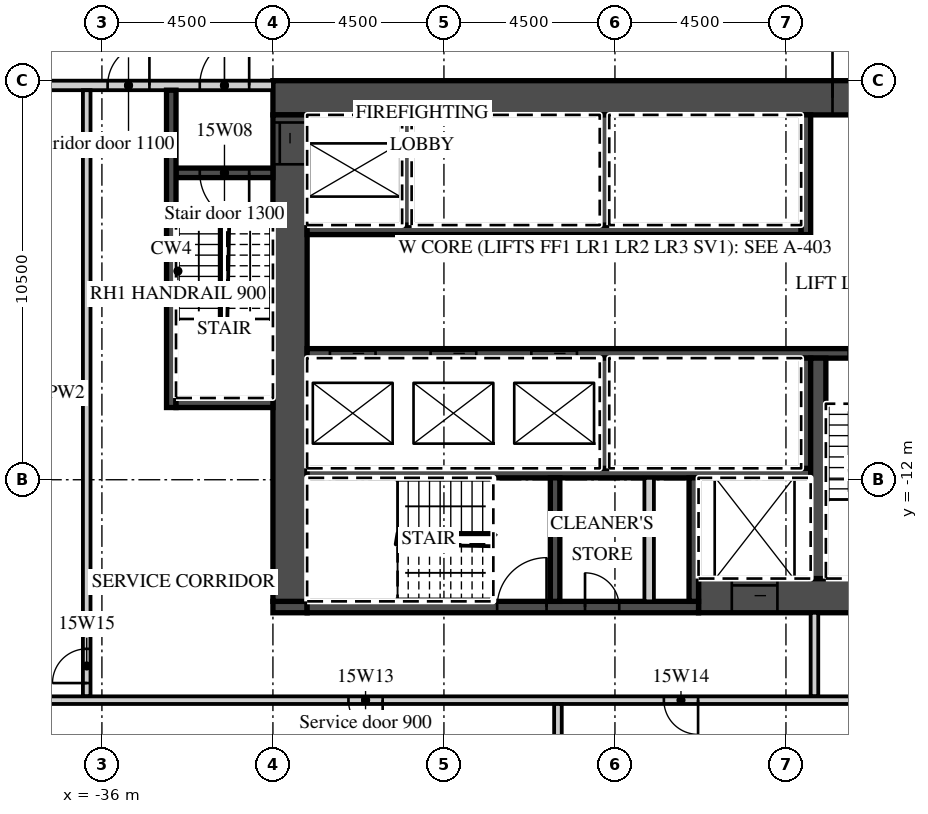
"""IFC4 building model, lengths in metres.
Left out: names, types, materials, properties, quantities, classifications, styles, units other than length and angle.
Written with IfcOpenShell. Run it as: python <this file> out.ifc"""

import sys

from ifc_helpers import new_model, si_unit, direction, frame, frame_2d, origin, place, context, subcontext, project, spatial, rectangle, extrude, element, fill, save


model = new_model("IFC4")
c1 = context("Model", 3, precision=1e-05, world=origin(), true_north=direction((0.0, 1.0)))
c2 = subcontext(c1, "Body", "Model", "MODEL_VIEW")
j1 = project(units=[si_unit("LENGTHUNIT", "METRE"), si_unit("PLANEANGLEUNIT", "RADIAN")], contexts=[c1])
p1 = place(None, origin())
s1 = spatial("IfcSite", under=j1, at=p1, CompositionType="ELEMENT")
p2 = place(p1, origin())
s2 = spatial("IfcBuilding", under=s1, at=p2, CompositionType="ELEMENT")
p3 = place(p2, frame((0.0, 0.0, 79.8)))
s3 = spatial("IfcBuildingStorey", under=s2, at=p3, CompositionType="ELEMENT", Elevation=79.8)
p4 = place(p3, frame((-31.5, -1.95, 0.0), z_axis=(0.0, 0.0, 1.0), x_axis=(1.0, 0.0, 0.0)))
e1 = element("IfcWall", 1, at=p4, inside=s3, PredefinedType="SHEAR", context=c2, shape_type="SweptSolid", body=[
    extrude(rectangle(XDim=18.0, YDim=0.9, at=frame_2d((9.0, 0.0))), origin(), (0.0, 0.0, 1.0), 3.02),
])
p5 = place(p4, frame((14.725, 0.0, 0.0)))
e2 = element("IfcOpeningElement", 2, at=p5, cuts=e1, PredefinedType="OPENING", context=c2, shape_type="SweptSolid", body=[
    extrude(rectangle(XDim=1.8, YDim=2.1, at=frame_2d((0.9, 1.05))), frame((0.0, 0.46, 0.0), z_axis=(0.0, -1.0, 0.0), x_axis=(1.0, 0.0, 0.0)), (0.0, 0.0, 1.0), 0.92),
])
p6 = place(p3, frame((-20.3, -15.05, 0.0), z_axis=(0.0, 0.0, 1.0), x_axis=(1.0, 0.0, 0.0)))
e3 = element("IfcWall", 3, at=p6, inside=s3, PredefinedType="SHEAR", context=c2, shape_type="SweptSolid", body=[
    extrude(rectangle(XDim=6.8, YDim=0.9, at=frame_2d((3.4, 0.0))), origin(), (0.0, 0.0, 1.0), 3.02),
])
p7 = place(p6, frame((0.875, 0.0, 0.0)))
e4 = element("IfcOpeningElement", 4, at=p7, cuts=e3, PredefinedType="OPENING", context=c2, shape_type="SweptSolid", body=[
    extrude(rectangle(XDim=1.2, YDim=2.1, at=frame_2d((0.6, 1.05))), frame((0.0, 0.46, 0.0), z_axis=(0.0, -1.0, 0.0), x_axis=(1.0, 0.0, 0.0)), (0.0, 0.0, 1.0), 0.92),
])
p8 = place(p3, frame((-31.5, -15.35, 0.0), z_axis=(0.0, 0.0, 1.0), x_axis=(1.0, 0.0, 0.0)))
e5 = element("IfcWall", 5, at=p8, inside=s3, PredefinedType="SHEAR", context=c2, shape_type="SweptSolid", body=[
    extrude(rectangle(XDim=0.9, YDim=0.3, at=frame_2d((0.45, 0.0))), origin(), (0.0, 0.0, 1.0), 3.02),
])
p9 = place(p3, frame((-30.6, -15.35, 0.0), z_axis=(0.0, 0.0, 1.0), x_axis=(1.0, 0.0, 0.0)))
e6 = element("IfcWall", 6, at=p9, inside=s3, PredefinedType="SHEAR", context=c2, shape_type="SweptSolid", body=[
    extrude(rectangle(XDim=10.3, YDim=0.3, at=frame_2d((5.15, 0.0))), origin(), (0.0, 0.0, 1.0), 3.02),
])
p10 = place(p9, frame((5.0, 0.0, 0.0)))
e7 = element("IfcOpeningElement", 7, at=p10, cuts=e6, PredefinedType="OPENING", context=c2, shape_type="SweptSolid", body=[
    extrude(rectangle(XDim=1.3, YDim=2.1, at=frame_2d((0.65, 1.05))), frame((0.0, 0.16, 0.0), z_axis=(0.0, -1.0, 0.0), x_axis=(1.0, 0.0, 0.0)), (0.0, 0.0, 1.0), 0.32),
])
p11 = place(p9, frame((7.312, 0.0, 0.0)))
e8 = element("IfcOpeningElement", 8, at=p11, cuts=e6, PredefinedType="OPENING", context=c2, shape_type="SweptSolid", body=[
    extrude(rectangle(XDim=0.9, YDim=2.1, at=frame_2d((0.45, 1.05))), frame((0.0, 0.16, 0.0), z_axis=(0.0, -1.0, 0.0), x_axis=(1.0, 0.0, 0.0)), (0.0, 0.0, 1.0), 0.32),
])
p12 = place(p3, frame((-31.05, -15.2, 0.0), z_axis=(0.0, 0.0, 1.0), x_axis=(0.0, 1.0, 0.0)))
e9 = element("IfcWall", 9, at=p12, inside=s3, PredefinedType="SHEAR", context=c2, shape_type="SweptSolid", body=[
    extrude(rectangle(XDim=12.8, YDim=0.9, at=frame_2d((6.4, 0.0))), origin(), (0.0, 0.0, 1.0), 3.02),
])
p13 = place(p12, frame((11.5, 0.0, 0.0)))
e10 = element("IfcOpeningElement", 10, at=p13, cuts=e9, PredefinedType="OPENING", context=c2, shape_type="SweptSolid", body=[
    extrude(rectangle(XDim=1.1, YDim=2.1, at=frame_2d((0.55, 1.05))), frame((0.0, 0.46, 0.0), z_axis=(0.0, -1.0, 0.0), x_axis=(1.0, 0.0, 0.0)), (0.0, 0.0, 1.0), 0.92),
])
p14 = place(p3, frame((-30.6, -5.425, 0.0), z_axis=(0.0, 0.0, 1.0), x_axis=(1.0, 0.0, 0.0)))
e11 = element("IfcWall", 11, at=p14, inside=s3, PredefinedType="SHEAR", context=c2, shape_type="SweptSolid", body=[
    extrude(rectangle(XDim=13.0, YDim=0.25, at=frame_2d((6.5, 0.0))), origin(), (0.0, 0.0, 1.0), 3.02),
])
p15 = place(p3, frame((-17.475, -5.55, 0.0), z_axis=(0.0, 0.0, 1.0), x_axis=(0.0, 1.0, 0.0)))
e12 = element("IfcWall", 12, at=p15, inside=s3, PredefinedType="SHEAR", context=c2, shape_type="SweptSolid", body=[
    extrude(rectangle(XDim=3.15, YDim=0.25, at=frame_2d((1.575, 0.0))), origin(), (0.0, 0.0, 1.0), 3.02),
])
for number, where, z_axis, x_axis in (
    (13, (-27.975, -5.3, 0.0), (0.0, 0.0, 1.0), (0.0, 1.0, 0.0)),
    (14, (-22.775, -5.3, 0.0), (0.0, 0.0, 1.0), (0.0, 1.0, 0.0)),
):
    element("IfcWall", number, at=place(p3, frame(where, z_axis=z_axis, x_axis=x_axis)), inside=s3, PredefinedType="SHEAR", context=c2, shape_type="SweptSolid", body=[
        extrude(rectangle(XDim=2.9, YDim=0.25, at=frame_2d((1.45, 0.0))), origin(), (0.0, 0.0, 1.0), 3.02),
    ])
p16 = place(p3, frame((-30.6, -8.675, 0.0), z_axis=(0.0, 0.0, 1.0), x_axis=(1.0, 0.0, 0.0)))
e15 = element("IfcWall", 15, at=p16, inside=s3, PredefinedType="SHEAR", context=c2, shape_type="SweptSolid", body=[
    extrude(rectangle(XDim=16.2, YDim=0.25, at=frame_2d((8.1, 0.0))), origin(), (0.0, 0.0, 1.0), 3.02),
])
p17 = place(p16, frame((0.6, 0.0, 0.0)))
e16 = element("IfcOpeningElement", 16, at=p17, cuts=e15, PredefinedType="OPENING", context=c2, shape_type="SweptSolid", body=[
    extrude(rectangle(XDim=1.2, YDim=2.1, at=frame_2d((0.6, 1.05))), frame((0.0, 0.135, 0.0), z_axis=(0.0, -1.0, 0.0), x_axis=(1.0, 0.0, 0.0)), (0.0, 0.0, 1.0), 0.27),
])
p18 = place(p16, frame((3.25, 0.0, 0.0)))
e17 = element("IfcOpeningElement", 17, at=p18, cuts=e15, PredefinedType="OPENING", context=c2, shape_type="SweptSolid", body=[
    extrude(rectangle(XDim=1.2, YDim=2.1, at=frame_2d((0.6, 1.05))), frame((0.0, 0.135, 0.0), z_axis=(0.0, -1.0, 0.0), x_axis=(1.0, 0.0, 0.0)), (0.0, 0.0, 1.0), 0.27),
])
p19 = place(p16, frame((5.9, 0.0, 0.0)))
e18 = element("IfcOpeningElement", 18, at=p19, cuts=e15, PredefinedType="OPENING", context=c2, shape_type="SweptSolid", body=[
    extrude(rectangle(XDim=1.2, YDim=2.1, at=frame_2d((0.6, 1.05))), frame((0.0, 0.135, 0.0), z_axis=(0.0, -1.0, 0.0), x_axis=(1.0, 0.0, 0.0)), (0.0, 0.0, 1.0), 0.27),
])
p20 = place(p16, frame((14.25, 0.0, 0.0)))
e19 = element("IfcOpeningElement", 19, at=p20, cuts=e15, PredefinedType="OPENING", context=c2, shape_type="SweptSolid", body=[
    extrude(rectangle(XDim=1.3, YDim=2.1, at=frame_2d((0.65, 1.05))), frame((0.0, 0.135, 0.0), z_axis=(0.0, -1.0, 0.0), x_axis=(1.0, 0.0, 0.0)), (0.0, 0.0, 1.0), 0.27),
])
p21 = place(p3, frame((-30.6, -11.825, 0.0), z_axis=(0.0, 0.0, 1.0), x_axis=(1.0, 0.0, 0.0)))
e20 = element("IfcWall", 20, at=p21, inside=s3, PredefinedType="SHEAR", context=c2, shape_type="SweptSolid", body=[
    extrude(rectangle(XDim=13.25, YDim=0.25, at=frame_2d((6.625, 0.0))), origin(), (0.0, 0.0, 1.0), 3.02),
])
for number, where, z_axis, x_axis in (
    (21, (-17.475, -11.7, 0.0), (0.0, 0.0, 1.0), (0.0, 1.0, 0.0)),
    (22, (-22.775, -11.7, 0.0), (0.0, 0.0, 1.0), (0.0, 1.0, 0.0)),
):
    element("IfcWall", number, at=place(p3, frame(where, z_axis=z_axis, x_axis=x_axis)), inside=s3, PredefinedType="SHEAR", context=c2, shape_type="SweptSolid", body=[
        extrude(rectangle(XDim=2.9, YDim=0.25, at=frame_2d((1.45, 0.0))), origin(), (0.0, 0.0, 1.0), 3.02),
    ])
p22 = place(p3, frame((-17.15, -14.6, 0.0), z_axis=(0.0, 0.0, 1.0), x_axis=(0.0, 1.0, 0.0)))
e23 = element("IfcWall", 23, at=p22, inside=s3, PredefinedType="SHEAR", context=c2, shape_type="SweptSolid", body=[
    extrude(rectangle(XDim=5.8, YDim=0.4, at=frame_2d((2.9, 0.0))), origin(), (0.0, 0.0, 1.0), 3.02),
])
for number, where, z_axis, x_axis in (
    (24, (-20.425, -15.2, 0.0), (0.0, 0.0, 1.0), (0.0, 1.0, 0.0)),
    (25, (-24.075, -15.2, 0.0), (0.0, 0.0, 1.0), (0.0, 1.0, 0.0)),
):
    element("IfcWall", number, at=place(p3, frame(where, z_axis=z_axis, x_axis=x_axis)), inside=s3, PredefinedType="SHEAR", context=c2, shape_type="SweptSolid", body=[
        extrude(rectangle(XDim=3.25, YDim=0.25, at=frame_2d((1.625, 0.0))), origin(), (0.0, 0.0, 1.0), 3.02),
    ])
p23 = place(p3, frame((-21.6, -15.2, 0.0), z_axis=(0.0, 0.0, 1.0), x_axis=(0.0, 1.0, 0.0)))
e26 = element("IfcWall", 26, at=p23, inside=s3, PredefinedType="PARTITIONING", context=c2, shape_type="SweptSolid", body=[
    extrude(rectangle(XDim=3.25, YDim=0.25, at=frame_2d((1.625, 0.0))), origin(), (0.0, 0.0, 1.0), 3.02),
])
p24 = place(p3, frame((-44.55, -1.625, 0.0), z_axis=(0.0, 0.0, 1.0), x_axis=(1.0, 0.0, 0.0)))
e27 = element("IfcWall", 27, at=p24, inside=s3, PredefinedType="PARTITIONING", context=c2, shape_type="SweptSolid", body=[
    extrude(rectangle(XDim=13.05, YDim=0.25, at=frame_2d((6.525, 0.0))), origin(), (0.0, 0.0, 1.0), 3.02),
])
p25 = place(p24, frame((11.125, 0.0, 0.0)))
e28 = element("IfcOpeningElement", 28, at=p25, cuts=e27, PredefinedType="OPENING", context=c2, shape_type="SweptSolid", body=[
    extrude(rectangle(XDim=1.3, YDim=2.1, at=frame_2d((0.65, 1.05))), frame((0.0, 0.135, 0.0), z_axis=(0.0, -1.0, 0.0), x_axis=(1.0, 0.0, 0.0)), (0.0, 0.0, 1.0), 0.27),
])
p26 = place(p24, frame((8.7, 0.0, 0.0)))
e29 = element("IfcOpeningElement", 29, at=p26, cuts=e27, PredefinedType="OPENING", context=c2, shape_type="SweptSolid", body=[
    extrude(rectangle(XDim=1.1, YDim=2.1, at=frame_2d((0.55, 1.05))), frame((0.0, 0.135, 0.0), z_axis=(0.0, -1.0, 0.0), x_axis=(1.0, 0.0, 0.0)), (0.0, 0.0, 1.0), 0.27),
])
p27 = place(p3, frame((-34.05, -3.925, 0.0), z_axis=(0.0, 0.0, 1.0), x_axis=(1.0, 0.0, 0.0)))
e30 = element("IfcWall", 30, at=p27, inside=s3, PredefinedType="SHEAR", context=c2, shape_type="SweptSolid", body=[
    extrude(rectangle(XDim=2.55, YDim=0.25, at=frame_2d((1.275, 0.0))), origin(), (0.0, 0.0, 1.0), 3.02),
])
p28 = place(p27, frame((0.625, 0.0, 0.0)))
e31 = element("IfcOpeningElement", 31, at=p28, cuts=e30, PredefinedType="OPENING", context=c2, shape_type="SweptSolid", body=[
    extrude(rectangle(XDim=1.3, YDim=2.1, at=frame_2d((0.65, 1.05))), frame((0.0, 0.135, 0.0), z_axis=(0.0, -1.0, 0.0), x_axis=(1.0, 0.0, 0.0)), (0.0, 0.0, 1.0), 0.27),
])
p29 = place(p3, frame((-34.175, -10.1, 0.0), z_axis=(0.0, 0.0, 1.0), x_axis=(0.0, 1.0, 0.0)))
e32 = element("IfcWall", 32, at=p29, inside=s3, PredefinedType="SHEAR", context=c2, shape_type="SweptSolid", body=[
    extrude(rectangle(XDim=8.35, YDim=0.25, at=frame_2d((4.175, 0.0))), origin(), (0.0, 0.0, 1.0), 3.02),
])
p30 = place(p3, frame((-34.05, -9.975, 0.0), z_axis=(0.0, 0.0, 1.0), x_axis=(1.0, 0.0, 0.0)))
e33 = element("IfcWall", 33, at=p30, inside=s3, PredefinedType="SHEAR", context=c2, shape_type="SweptSolid", body=[
    extrude(rectangle(XDim=2.55, YDim=0.25, at=frame_2d((1.275, 0.0))), origin(), (0.0, 0.0, 1.0), 3.02),
])
p31 = place(p3, frame((-17.25, -17.7, 0.0), z_axis=(0.0, 0.0, 1.0), x_axis=(0.0, 1.0, 0.0)))
e34 = element("IfcWall", 34, at=p31, inside=s3, PredefinedType="PARTITIONING", context=c2, shape_type="SweptSolid", body=[
    extrude(rectangle(XDim=2.2, YDim=0.2, at=frame_2d((1.1, 0.0))), origin(), (0.0, 0.0, 1.0), 3.02),
])
p32 = place(p3, frame((-36.4, -17.7, 0.0), z_axis=(0.0, 0.0, 1.0), x_axis=(0.0, 1.0, 0.0)))
e35 = element("IfcWall", 35, at=p32, inside=s3, PredefinedType="PARTITIONING", context=c2, shape_type="SweptSolid", body=[
    extrude(rectangle(XDim=15.95, YDim=0.2, at=frame_2d((7.975, 0.0))), origin(), (0.0, 0.0, 1.0), 3.02),
])
p33 = place(p32, frame((0.35, 0.0, 0.0)))
e36 = element("IfcOpeningElement", 36, at=p33, cuts=e35, PredefinedType="OPENING", context=c2, shape_type="SweptSolid", body=[
    extrude(rectangle(XDim=0.9, YDim=2.1, at=frame_2d((0.45, 1.05))), frame((0.0, 0.11, 0.0), z_axis=(0.0, -1.0, 0.0), x_axis=(1.0, 0.0, 0.0)), (0.0, 0.0, 1.0), 0.22),
])
p34 = place(p3, frame((-44.55, -17.8, 0.0), z_axis=(0.0, 0.0, 1.0), x_axis=(1.0, 0.0, 0.0)))
e37 = element("IfcWall", 37, at=p34, inside=s3, PredefinedType="PARTITIONING", context=c2, shape_type="SweptSolid", body=[
    extrude(rectangle(XDim=30.95, YDim=0.2, at=frame_2d((15.475, 0.0))), origin(), (0.0, 0.0, 1.0), 3.02),
])
p35 = place(p34, frame((15.038, 0.0, 0.0)))
e38 = element("IfcOpeningElement", 38, at=p35, cuts=e37, PredefinedType="OPENING", context=c2, shape_type="SweptSolid", body=[
    extrude(rectangle(XDim=0.9, YDim=2.1, at=frame_2d((0.45, 1.05))), frame((0.0, 0.11, 0.0), z_axis=(0.0, -1.0, 0.0), x_axis=(1.0, 0.0, 0.0)), (0.0, 0.0, 1.0), 0.22),
])
p36 = place(p34, frame((23.337, 0.0, 0.0)))
e39 = element("IfcOpeningElement", 39, at=p36, cuts=e37, PredefinedType="OPENING", context=c2, shape_type="SweptSolid", body=[
    extrude(rectangle(XDim=0.9, YDim=2.1, at=frame_2d((0.45, 1.05))), frame((0.0, 0.11, 0.0), z_axis=(0.0, -1.0, 0.0), x_axis=(1.0, 0.0, 0.0)), (0.0, 0.0, 1.0), 0.22),
])
p37 = place(p3, frame((-24.0, -21.55, 0.0), z_axis=(0.0, 0.0, 1.0), x_axis=(0.0, 1.0, 0.0)))
e40 = element("IfcWall", 40, at=p37, inside=s3, PredefinedType="PARTITIONING", context=c2, shape_type="SweptSolid", body=[
    extrude(rectangle(XDim=3.65, YDim=0.2, at=frame_2d((1.825, 0.0))), origin(), (0.0, 0.0, 1.0), 3.02),
])
p38 = place(p17, origin())
e41 = element("IfcDoor", 41, at=p38, inside=s3, OperationType="SLIDING_TO_LEFT", PredefinedType="DOOR", context=c2, shape_type="SweptSolid", body=[
    extrude(rectangle(XDim=1.2, YDim=2.1, at=frame_2d((0.6, 1.05))), frame((0.0, 0.025, 0.0), z_axis=(0.0, -1.0, 0.0), x_axis=(1.0, 0.0, 0.0)), (0.0, 0.0, 1.0), 0.05),
])
fill(e16, e41)
p39 = place(p18, origin())
e42 = element("IfcDoor", 42, at=p39, inside=s3, OperationType="SLIDING_TO_RIGHT", PredefinedType="DOOR", context=c2, shape_type="SweptSolid", body=[
    extrude(rectangle(XDim=1.2, YDim=2.1, at=frame_2d((0.6, 1.05))), frame((0.0, 0.025, 0.0), z_axis=(0.0, -1.0, 0.0), x_axis=(1.0, 0.0, 0.0)), (0.0, 0.0, 1.0), 0.05),
])
fill(e17, e42)
p40 = place(p19, origin())
e43 = element("IfcDoor", 43, at=p40, inside=s3, OperationType="SLIDING_TO_RIGHT", PredefinedType="DOOR", context=c2, shape_type="SweptSolid", body=[
    extrude(rectangle(XDim=1.2, YDim=2.1, at=frame_2d((0.6, 1.05))), frame((0.0, 0.025, 0.0), z_axis=(0.0, -1.0, 0.0), x_axis=(1.0, 0.0, 0.0)), (0.0, 0.0, 1.0), 0.05),
])
fill(e18, e43)
p41 = place(p7, origin())
e44 = element("IfcDoor", 44, at=p41, inside=s3, OperationType="SLIDING_TO_LEFT", PredefinedType="DOOR", context=c2, shape_type="SweptSolid", body=[
    extrude(rectangle(XDim=1.2, YDim=2.1, at=frame_2d((0.6, 1.05))), frame((0.0, 0.025, 0.0), z_axis=(0.0, -1.0, 0.0), x_axis=(1.0, 0.0, 0.0)), (0.0, 0.0, 1.0), 0.05),
])
fill(e4, e44)
p42 = place(p13, origin())
e45 = element("IfcDoor", 45, at=p42, inside=s3, OperationType="SLIDING_TO_RIGHT", PredefinedType="DOOR", context=c2, shape_type="SweptSolid", body=[
    extrude(rectangle(XDim=1.1, YDim=2.1, at=frame_2d((0.55, 1.05))), frame((0.0, 0.025, 0.0), z_axis=(0.0, -1.0, 0.0), x_axis=(1.0, 0.0, 0.0)), (0.0, 0.0, 1.0), 0.05),
])
fill(e10, e45)
p43 = place(p5, origin())
e46 = element("IfcDoor", 46, at=p43, inside=s3, OperationType="DOUBLE_DOOR_DOUBLE_SWING", PredefinedType="DOOR", context=c2, shape_type="SweptSolid", body=[
    extrude(rectangle(XDim=1.8, YDim=2.1, at=frame_2d((0.9, 1.05))), frame((0.0, 0.025, 0.0), z_axis=(0.0, -1.0, 0.0), x_axis=(1.0, 0.0, 0.0)), (0.0, 0.0, 1.0), 0.05),
])
fill(e2, e46)
p44 = place(p25, origin())
e47 = element("IfcDoor", 47, at=p44, inside=s3, OperationType="SINGLE_SWING_RIGHT", PredefinedType="DOOR", context=c2, shape_type="SweptSolid", body=[
    extrude(rectangle(XDim=1.3, YDim=2.1, at=frame_2d((0.65, 1.05))), frame((0.0, 0.025, 0.0), z_axis=(0.0, -1.0, 0.0), x_axis=(1.0, 0.0, 0.0)), (0.0, 0.0, 1.0), 0.05),
])
fill(e28, e47)
p45 = place(p28, origin())
e48 = element("IfcDoor", 48, at=p45, inside=s3, OperationType="SINGLE_SWING_RIGHT", PredefinedType="DOOR", context=c2, shape_type="SweptSolid", body=[
    extrude(rectangle(XDim=1.3, YDim=2.1, at=frame_2d((0.65, 1.05))), frame((0.0, 0.025, 0.0), z_axis=(0.0, -1.0, 0.0), x_axis=(1.0, 0.0, 0.0)), (0.0, 0.0, 1.0), 0.05),
])
fill(e31, e48)
p46 = place(p26, origin())
e49 = element("IfcDoor", 49, at=p46, inside=s3, OperationType="SINGLE_SWING_RIGHT", PredefinedType="DOOR", context=c2, shape_type="SweptSolid", body=[
    extrude(rectangle(XDim=1.1, YDim=2.1, at=frame_2d((0.55, 1.05))), frame((0.0, 0.025, 0.0), z_axis=(0.0, -1.0, 0.0), x_axis=(1.0, 0.0, 0.0)), (0.0, 0.0, 1.0), 0.05),
])
fill(e29, e49)
p47 = place(p20, origin())
e50 = element("IfcDoor", 50, at=p47, inside=s3, OperationType="SINGLE_SWING_RIGHT", PredefinedType="DOOR", context=c2, shape_type="SweptSolid", body=[
    extrude(rectangle(XDim=1.3, YDim=2.1, at=frame_2d((0.65, 1.05))), frame((0.0, 0.025, 0.0), z_axis=(0.0, -1.0, 0.0), x_axis=(1.0, 0.0, 0.0)), (0.0, 0.0, 1.0), 0.05),
])
fill(e19, e50)
p48 = place(p10, origin())
e51 = element("IfcDoor", 51, at=p48, inside=s3, OperationType="SINGLE_SWING_RIGHT", PredefinedType="DOOR", context=c2, shape_type="SweptSolid", body=[
    extrude(rectangle(XDim=1.3, YDim=2.1, at=frame_2d((0.65, 1.05))), frame((0.0, 0.025, 0.0), z_axis=(0.0, -1.0, 0.0), x_axis=(1.0, 0.0, 0.0)), (0.0, 0.0, 1.0), 0.05),
])
fill(e7, e51)
p49 = place(p11, origin())
e52 = element("IfcDoor", 52, at=p49, inside=s3, OperationType="SINGLE_SWING_LEFT", PredefinedType="DOOR", context=c2, shape_type="SweptSolid", body=[
    extrude(rectangle(XDim=0.9, YDim=2.1, at=frame_2d((0.45, 1.05))), frame((0.0, 0.025, 0.0), z_axis=(0.0, -1.0, 0.0), x_axis=(1.0, 0.0, 0.0)), (0.0, 0.0, 1.0), 0.05),
])
fill(e8, e52)
p50 = place(p35, origin())
e53 = element("IfcDoor", 53, at=p50, inside=s3, OperationType="SINGLE_SWING_RIGHT", PredefinedType="DOOR", context=c2, shape_type="SweptSolid", body=[
    extrude(rectangle(XDim=0.9, YDim=2.1, at=frame_2d((0.45, 1.05))), frame((0.0, 0.025, 0.0), z_axis=(0.0, -1.0, 0.0), x_axis=(1.0, 0.0, 0.0)), (0.0, 0.0, 1.0), 0.05),
])
fill(e38, e53)
p51 = place(p36, origin())
e54 = element("IfcDoor", 54, at=p51, inside=s3, OperationType="SINGLE_SWING_RIGHT", PredefinedType="DOOR", context=c2, shape_type="SweptSolid", body=[
    extrude(rectangle(XDim=0.9, YDim=2.1, at=frame_2d((0.45, 1.05))), frame((0.0, 0.025, 0.0), z_axis=(0.0, -1.0, 0.0), x_axis=(1.0, 0.0, 0.0)), (0.0, 0.0, 1.0), 0.05),
])
fill(e39, e54)
p52 = place(p33, origin())
e55 = element("IfcDoor", 55, at=p52, inside=s3, OperationType="SINGLE_SWING_LEFT", PredefinedType="DOOR", context=c2, shape_type="SweptSolid", body=[
    extrude(rectangle(XDim=0.9, YDim=2.1, at=frame_2d((0.45, 1.05))), frame((0.0, 0.025, 0.0), z_axis=(0.0, -1.0, 0.0), x_axis=(1.0, 0.0, 0.0)), (0.0, 0.0, 1.0), 0.05),
])
fill(e36, e55)
save(model, sys.argv[1])
